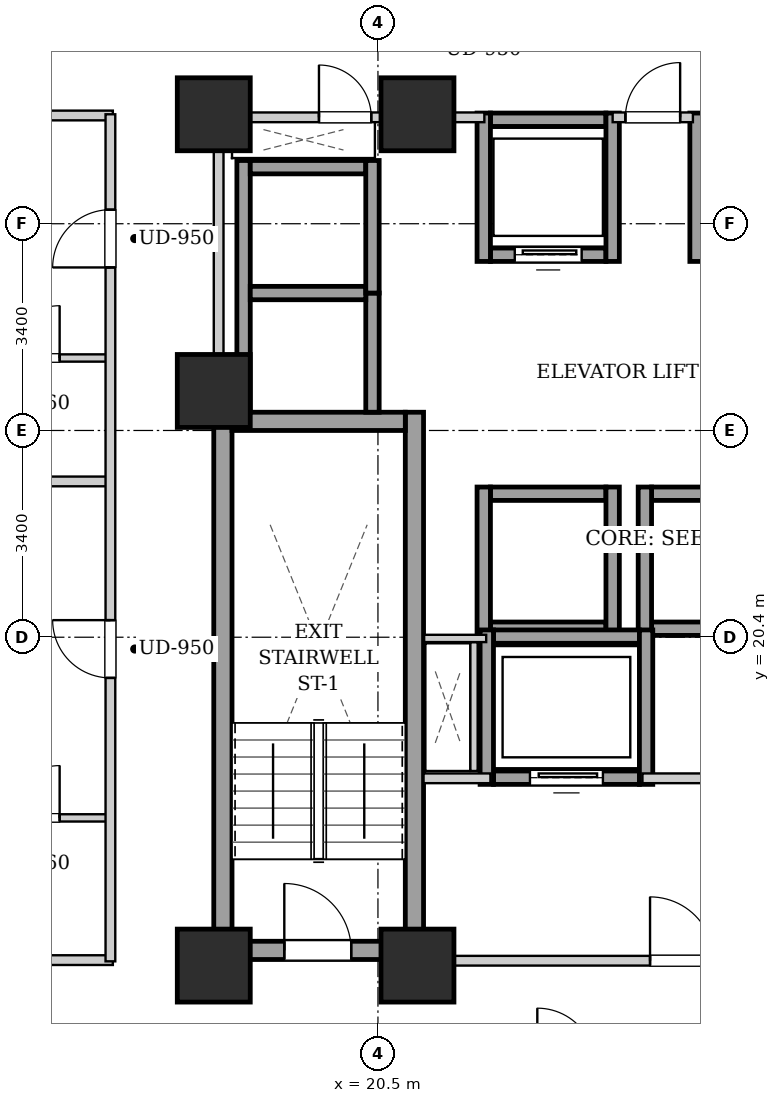
"""IFC4 building model, lengths in metres.
Left out: names, types, materials, properties, quantities, classifications, styles, units other than length and angle.
Written with IfcOpenShell. Run it as: python <this file> out.ifc"""

import sys

from ifc_helpers import new_model, si_unit, direction, frame, frame_2d, origin, origin_2d, place, context, subcontext, project, spatial, rectangle, extrude, element, fill, save


model = new_model("IFC4")
c1 = context("Model", 3, precision=1e-05, world=origin(), true_north=direction((0.0, 1.0)))
c2 = subcontext(c1, "Body", "Model", "MODEL_VIEW")
j1 = project(units=[si_unit("LENGTHUNIT", "METRE"), si_unit("PLANEANGLEUNIT", "RADIAN")], contexts=[c1])
p1 = place(None, origin())
s1 = spatial("IfcSite", under=j1, at=p1, CompositionType="ELEMENT")
p2 = place(p1, origin())
s2 = spatial("IfcBuilding", under=s1, at=p2, CompositionType="ELEMENT")
p3 = place(p2, frame((0.0, 0.0, 67.4)))
s3 = spatial("IfcBuildingStorey", under=s2, at=p3, CompositionType="ELEMENT", Elevation=67.4)
for number, where, z_axis, x_axis in (
    (1, (17.8, 15.0, 0.0), (0.0, 0.0, 1.0), (1.0, 0.0, 0.0)),
    (2, (21.15, 15.0, 0.0), (0.0, 0.0, 1.0), (1.0, 0.0, 0.0)),
    (3, (17.8, 29.0, 0.0), (0.0, 0.0, 1.0), (1.0, 0.0, 0.0)),
    (4, (21.15, 29.0, 0.0), (0.0, 0.0, 1.0), (1.0, 0.0, 0.0)),
    (5, (17.8, 24.45, 0.0), (0.0, 0.0, 1.0), (1.0, 0.0, 0.0)),
):
    element("IfcColumn", number, at=place(p3, frame(where, z_axis=z_axis, x_axis=x_axis)), inside=s3, PredefinedType="COLUMN", context=c2, shape_type="SweptSolid", body=[
        extrude(rectangle(XDim=1.2, YDim=1.2, at=origin_2d()), origin(), (0.0, 0.0, 1.0), 3.2),
    ])
for number, where, z_axis, x_axis in (
    (6, (17.95, 15.1, 0.0), (0.0, 0.0, 1.0), (0.0, 1.0, 0.0)),
    (7, (21.1, 15.1, 0.0), (0.0, 0.0, 1.0), (0.0, 1.0, 0.0)),
):
    element("IfcWall", number, at=place(p3, frame(where, z_axis=z_axis, x_axis=x_axis)), inside=s3, PredefinedType="SHEAR", context=c2, shape_type="SweptSolid", body=[
        extrude(rectangle(XDim=9.0, YDim=0.3, at=frame_2d((4.5, 0.0))), origin(), (0.0, 0.0, 1.0), 2.88),
    ])
p4 = place(p3, frame((18.1, 23.95, 0.0), z_axis=(0.0, 0.0, 1.0), x_axis=(1.0, 0.0, 0.0)))
e8 = element("IfcWall", 8, at=p4, inside=s3, PredefinedType="SHEAR", context=c2, shape_type="SweptSolid", body=[
    extrude(rectangle(XDim=2.85, YDim=0.3, at=frame_2d((1.425, 0.0))), origin(), (0.0, 0.0, 1.0), 2.88),
])
p5 = place(p3, frame((18.1, 15.25, 0.0), z_axis=(0.0, 0.0, 1.0), x_axis=(1.0, 0.0, 0.0)))
e9 = element("IfcWall", 9, at=p5, inside=s3, PredefinedType="SHEAR", context=c2, shape_type="SweptSolid", body=[
    extrude(rectangle(XDim=2.85, YDim=0.3, at=frame_2d((1.425, 0.0))), origin(), (0.0, 0.0, 1.0), 2.88),
])
p6 = place(p5, frame((0.86, 0.0, 0.0)))
e10 = element("IfcOpeningElement", 10, at=p6, cuts=e9, PredefinedType="OPENING", context=c2, shape_type="SweptSolid", body=[
    extrude(rectangle(XDim=1.1, YDim=2.05, at=frame_2d((0.55, 1.025))), frame((0.0, 0.16, 0.0), z_axis=(0.0, -1.0, 0.0), x_axis=(1.0, 0.0, 0.0)), (0.0, 0.0, 1.0), 0.32),
])
p7 = place(p3, frame((22.35, 26.69, 0.0), z_axis=(0.0, 0.0, 1.0), x_axis=(1.0, 0.0, 0.0)))
e11 = element("IfcWall", 11, at=p7, inside=s3, PredefinedType="SHEAR", context=c2, shape_type="SweptSolid", body=[
    extrude(rectangle(XDim=1.9, YDim=0.22, at=frame_2d((0.95, 0.0))), origin(), (0.0, 0.0, 1.0), 2.88),
])
p8 = place(p7, frame((0.4, 0.0, 0.0)))
e12 = element("IfcOpeningElement", 12, at=p8, cuts=e11, PredefinedType="OPENING", context=c2, shape_type="SweptSolid", body=[
    extrude(rectangle(XDim=1.1, YDim=2.15, at=frame_2d((0.55, 1.075))), frame((0.0, 0.12, 0.0), z_axis=(0.0, -1.0, 0.0), x_axis=(1.0, 0.0, 0.0)), (0.0, 0.0, 1.0), 0.24),
])
p9 = place(p3, frame((22.35, 28.91, 0.0), z_axis=(0.0, 0.0, 1.0), x_axis=(1.0, 0.0, 0.0)))
e13 = element("IfcWall", 13, at=p9, inside=s3, PredefinedType="SHEAR", context=c2, shape_type="SweptSolid", body=[
    extrude(rectangle(XDim=1.9, YDim=0.22, at=frame_2d((0.95, 0.0))), origin(), (0.0, 0.0, 1.0), 2.88),
])
for number, where, z_axis, x_axis in (
    (14, (22.24, 26.58, 0.0), (0.0, 0.0, 1.0), (0.0, 1.0, 0.0)),
    (15, (24.36, 26.58, 0.0), (0.0, 0.0, 1.0), (0.0, 1.0, 0.0)),
    (16, (25.74, 26.58, 0.0), (0.0, 0.0, 1.0), (0.0, 1.0, 0.0)),
):
    element("IfcWall", number, at=place(p3, frame(where, z_axis=z_axis, x_axis=x_axis)), inside=s3, PredefinedType="SHEAR", context=c2, shape_type="SweptSolid", body=[
        extrude(rectangle(XDim=2.44, YDim=0.22, at=frame_2d((1.22, 0.0))), origin(), (0.0, 0.0, 1.0), 2.88),
    ])
for number, where, z_axis, x_axis in (
    (17, (22.35, 20.54, 0.0), (0.0, 0.0, 1.0), (1.0, 0.0, 0.0)),
    (18, (22.35, 22.76, 0.0), (0.0, 0.0, 1.0), (1.0, 0.0, 0.0)),
):
    element("IfcWall", number, at=place(p3, frame(where, z_axis=z_axis, x_axis=x_axis)), inside=s3, PredefinedType="SHEAR", context=c2, shape_type="SweptSolid", body=[
        extrude(rectangle(XDim=1.9, YDim=0.22, at=frame_2d((0.95, 0.0))), origin(), (0.0, 0.0, 1.0), 2.88),
    ])
for number, where, z_axis, x_axis in (
    (19, (22.24, 20.43, 0.0), (0.0, 0.0, 1.0), (0.0, 1.0, 0.0)),
    (20, (24.36, 20.43, 0.0), (0.0, 0.0, 1.0), (0.0, 1.0, 0.0)),
):
    element("IfcWall", number, at=place(p3, frame(where, z_axis=z_axis, x_axis=x_axis)), inside=s3, PredefinedType="SHEAR", context=c2, shape_type="SweptSolid", body=[
        extrude(rectangle(XDim=2.44, YDim=0.22, at=frame_2d((1.22, 0.0))), origin(), (0.0, 0.0, 1.0), 2.88),
    ])
for number, where, z_axis, x_axis in (
    (21, (25.0, 20.54, 0.0), (0.0, 0.0, 1.0), (1.0, 0.0, 0.0)),
    (22, (25.0, 22.76, 0.0), (0.0, 0.0, 1.0), (1.0, 0.0, 0.0)),
):
    element("IfcWall", number, at=place(p3, frame(where, z_axis=z_axis, x_axis=x_axis)), inside=s3, PredefinedType="SHEAR", context=c2, shape_type="SweptSolid", body=[
        extrude(rectangle(XDim=1.9, YDim=0.22, at=frame_2d((0.95, 0.0))), origin(), (0.0, 0.0, 1.0), 2.88),
    ])
p10 = place(p3, frame((24.89, 20.43, 0.0), z_axis=(0.0, 0.0, 1.0), x_axis=(0.0, 1.0, 0.0)))
e23 = element("IfcWall", 23, at=p10, inside=s3, PredefinedType="SHEAR", context=c2, shape_type="SweptSolid", body=[
    extrude(rectangle(XDim=2.44, YDim=0.22, at=frame_2d((1.22, 0.0))), origin(), (0.0, 0.0, 1.0), 2.88),
])
p11 = place(p3, frame((18.29, 24.1, 0.0), z_axis=(0.0, 0.0, 1.0), x_axis=(0.0, 1.0, 0.0)))
e24 = element("IfcWall", 24, at=p11, inside=s3, PredefinedType="SHEAR", context=c2, shape_type="SweptSolid", body=[
    extrude(rectangle(XDim=4.14, YDim=0.22, at=frame_2d((2.07, 0.0))), origin(), (0.0, 0.0, 1.0), 2.88),
])
p12 = place(p3, frame((20.41, 24.1, 0.0), z_axis=(0.0, 0.0, 1.0), x_axis=(0.0, 1.0, 0.0)))
e25 = element("IfcWall", 25, at=p12, inside=s3, PredefinedType="SHEAR", context=c2, shape_type="SweptSolid", body=[
    extrude(rectangle(XDim=1.96, YDim=0.22, at=frame_2d((0.98, 0.0))), origin(), (0.0, 0.0, 1.0), 2.88),
])
for number, where, z_axis, x_axis in (
    (26, (18.4, 26.06, 0.0), (0.0, 0.0, 1.0), (1.0, 0.0, 0.0)),
    (27, (18.4, 28.13, 0.0), (0.0, 0.0, 1.0), (1.0, 0.0, 0.0)),
):
    element("IfcWall", number, at=place(p3, frame(where, z_axis=z_axis, x_axis=x_axis)), inside=s3, PredefinedType="SHEAR", context=c2, shape_type="SweptSolid", body=[
        extrude(rectangle(XDim=1.9, YDim=0.22, at=frame_2d((0.95, 0.0))), origin(), (0.0, 0.0, 1.0), 2.88),
    ])
p13 = place(p3, frame((20.41, 26.06, 0.0), z_axis=(0.0, 0.0, 1.0), x_axis=(0.0, 1.0, 0.0)))
e28 = element("IfcWall", 28, at=p13, inside=s3, PredefinedType="SHEAR", context=c2, shape_type="SweptSolid", body=[
    extrude(rectangle(XDim=2.18, YDim=0.22, at=frame_2d((1.09, 0.0))), origin(), (0.0, 0.0, 1.0), 2.88),
])
p14 = place(p3, frame((22.4, 18.09, 0.0), z_axis=(0.0, 0.0, 1.0), x_axis=(1.0, 0.0, 0.0)))
e29 = element("IfcWall", 29, at=p14, inside=s3, PredefinedType="SHEAR", context=c2, shape_type="SweptSolid", body=[
    extrude(rectangle(XDim=2.4, YDim=0.22, at=frame_2d((1.2, 0.0))), origin(), (0.0, 0.0, 1.0), 2.88),
])
p15 = place(p14, frame((0.6, 0.0, 0.0)))
e30 = element("IfcOpeningElement", 30, at=p15, cuts=e29, PredefinedType="OPENING", context=c2, shape_type="SweptSolid", body=[
    extrude(rectangle(XDim=1.2, YDim=2.15, at=frame_2d((0.6, 1.075))), frame((0.0, 0.12, 0.0), z_axis=(0.0, -1.0, 0.0), x_axis=(1.0, 0.0, 0.0)), (0.0, 0.0, 1.0), 0.24),
])
p16 = place(p3, frame((22.4, 20.41, 0.0), z_axis=(0.0, 0.0, 1.0), x_axis=(1.0, 0.0, 0.0)))
e31 = element("IfcWall", 31, at=p16, inside=s3, PredefinedType="SHEAR", context=c2, shape_type="SweptSolid", body=[
    extrude(rectangle(XDim=2.4, YDim=0.22, at=frame_2d((1.2, 0.0))), origin(), (0.0, 0.0, 1.0), 2.88),
])
for number, where, z_axis, x_axis in (
    (32, (22.29, 17.98, 0.0), (0.0, 0.0, 1.0), (0.0, 1.0, 0.0)),
    (33, (24.91, 17.98, 0.0), (0.0, 0.0, 1.0), (0.0, 1.0, 0.0)),
):
    element("IfcWall", number, at=place(p3, frame(where, z_axis=z_axis, x_axis=x_axis)), inside=s3, PredefinedType="SHEAR", context=c2, shape_type="SweptSolid", body=[
        extrude(rectangle(XDim=2.54, YDim=0.22, at=frame_2d((1.27, 0.0))), origin(), (0.0, 0.0, 1.0), 2.88),
    ])
p17 = place(p3, frame((21.25, 15.08, 0.0), z_axis=(0.0, 0.0, 1.0), x_axis=(1.0, 0.0, 0.0)))
e34 = element("IfcWall", 34, at=p17, inside=s3, PredefinedType="PARTITIONING", context=c2, shape_type="SweptSolid", body=[
    extrude(rectangle(XDim=8.5, YDim=0.16, at=frame_2d((4.25, 0.0))), origin(), (0.0, 0.0, 1.0), 2.172),
])
p18 = place(p17, frame((3.725, 0.0, 0.0)))
e35 = element("IfcOpeningElement", 35, at=p18, cuts=e34, PredefinedType="OPENING", context=c2, shape_type="SweptSolid", body=[
    extrude(rectangle(XDim=1.05, YDim=2.05, at=frame_2d((0.525, 1.025))), frame((0.0, 0.09, 0.0), z_axis=(0.0, -1.0, 0.0), x_axis=(1.0, 0.0, 0.0)), (0.0, 0.0, 1.0), 0.18),
])
p19 = place(p3, frame((21.25, 18.08, 0.0), z_axis=(0.0, 0.0, 1.0), x_axis=(1.0, 0.0, 0.0)))
e36 = element("IfcWall", 36, at=p19, inside=s3, PredefinedType="PARTITIONING", context=c2, shape_type="SweptSolid", body=[
    extrude(rectangle(XDim=1.1, YDim=0.16, at=frame_2d((0.55, 0.0))), origin(), (0.0, 0.0, 1.0), 2.88),
])
p20 = place(p3, frame((24.85, 18.08, 0.0), z_axis=(0.0, 0.0, 1.0), x_axis=(1.0, 0.0, 0.0)))
e37 = element("IfcWall", 37, at=p20, inside=s3, PredefinedType="PARTITIONING", context=c2, shape_type="SweptSolid", body=[
    extrude(rectangle(XDim=1.3, YDim=0.16, at=frame_2d((0.65, 0.0))), origin(), (0.0, 0.0, 1.0), 2.88),
])
p21 = place(p3, frame((17.88, 24.12, 0.0), z_axis=(0.0, 0.0, 1.0), x_axis=(0.0, 1.0, 0.0)))
e38 = element("IfcWall", 38, at=p21, inside=s3, PredefinedType="PARTITIONING", context=c2, shape_type="SweptSolid", body=[
    extrude(rectangle(XDim=4.76, YDim=0.16, at=frame_2d((2.38, 0.0))), origin(), (0.0, 0.0, 1.0), 2.215),
])
p22 = place(p3, frame((24.36, 28.95, 0.0), z_axis=(0.0, 0.0, 1.0), x_axis=(1.0, 0.0, 0.0)))
e39 = element("IfcWall", 39, at=p22, inside=s3, PredefinedType="PARTITIONING", context=c2, shape_type="SweptSolid", body=[
    extrude(rectangle(XDim=1.32, YDim=0.16, at=frame_2d((0.66, 0.0))), origin(), (0.0, 0.0, 1.0), 2.172),
])
p23 = place(p22, frame((0.21, 0.0, 0.0)))
e40 = element("IfcOpeningElement", 40, at=p23, cuts=e39, PredefinedType="OPENING", context=c2, shape_type="SweptSolid", body=[
    extrude(rectangle(XDim=0.9, YDim=2.05, at=frame_2d((0.45, 1.025))), frame((0.0, 0.09, 0.0), z_axis=(0.0, -1.0, 0.0), x_axis=(1.0, 0.0, 0.0)), (0.0, 0.0, 1.0), 0.18),
])
p24 = place(p3, frame((17.96, 28.95, 0.0), z_axis=(0.0, 0.0, 1.0), x_axis=(1.0, 0.0, 0.0)))
e41 = element("IfcWall", 41, at=p24, inside=s3, PredefinedType="PARTITIONING", context=c2, shape_type="SweptSolid", body=[
    extrude(rectangle(XDim=4.29, YDim=0.16, at=frame_2d((2.145, 0.0))), origin(), (0.0, 0.0, 1.0), 2.172),
])
p25 = place(p24, frame((1.57, 0.0, 0.0)))
e42 = element("IfcOpeningElement", 42, at=p25, cuts=e41, PredefinedType="OPENING", context=c2, shape_type="SweptSolid", body=[
    extrude(rectangle(XDim=0.86, YDim=2.05, at=frame_2d((0.43, 1.025))), frame((0.0, 0.09, 0.0), z_axis=(0.0, -1.0, 0.0), x_axis=(1.0, 0.0, 0.0)), (0.0, 0.0, 1.0), 0.18),
])
p26 = place(p3, frame((22.08, 18.2, 0.0), z_axis=(0.0, 0.0, 1.0), x_axis=(0.0, 1.0, 0.0)))
e43 = element("IfcWall", 43, at=p26, inside=s3, PredefinedType="PARTITIONING", context=c2, shape_type="SweptSolid", body=[
    extrude(rectangle(XDim=2.12, YDim=0.12, at=frame_2d((1.06, 0.0))), origin(), (0.0, 0.0, 1.0), 2.88),
])
p27 = place(p3, frame((22.28, 20.38, 0.0), z_axis=(0.0, 0.0, 1.0), x_axis=(-1.0, 0.0, 0.0)))
e44 = element("IfcWall", 44, at=p27, inside=s3, PredefinedType="PARTITIONING", context=c2, shape_type="SweptSolid", body=[
    extrude(rectangle(XDim=1.02, YDim=0.12, at=frame_2d((0.51, 0.0))), origin(), (0.0, 0.0, 1.0), 2.88),
])
for number, where, z_axis, x_axis in (
    (45, (7.78, 15.09, 0.0), (0.0, 0.0, 1.0), (1.0, 0.0, 0.0)),
    (46, (7.78, 28.98, 0.0), (0.0, 0.0, 1.0), (1.0, 0.0, 0.0)),
):
    element("IfcWall", number, at=place(p3, frame(where, z_axis=z_axis, x_axis=x_axis)), inside=s3, PredefinedType="PARTITIONING", context=c2, shape_type="SweptSolid", body=[
        extrude(rectangle(XDim=8.36, YDim=0.16, at=frame_2d((4.18, 0.0))), origin(), (0.0, 0.0, 1.0), 2.172),
    ])
p28 = place(p3, frame((7.78, 22.962, 0.0), z_axis=(0.0, 0.0, 1.0), x_axis=(1.0, 0.0, 0.0)))
e47 = element("IfcWall", 47, at=p28, inside=s3, PredefinedType="PARTITIONING", context=c2, shape_type="SweptSolid", body=[
    extrude(rectangle(XDim=8.28, YDim=0.16, at=frame_2d((4.14, 0.0))), origin(), (0.0, 0.0, 1.0), 2.88),
])
p29 = place(p3, frame((13.61, 17.429, 0.0), z_axis=(0.0, 0.0, 1.0), x_axis=(1.0, 0.0, 0.0)))
e48 = element("IfcWall", 48, at=p29, inside=s3, PredefinedType="PARTITIONING", context=c2, shape_type="SweptSolid", body=[
    extrude(rectangle(XDim=2.45, YDim=0.12, at=frame_2d((1.225, 0.0))), origin(), (0.0, 0.0, 1.0), 2.88),
])
p30 = place(p29, frame((0.795, 0.0, 0.0)))
e49 = element("IfcOpeningElement", 49, at=p30, cuts=e48, PredefinedType="OPENING", context=c2, shape_type="SweptSolid", body=[
    extrude(rectangle(XDim=0.86, YDim=2.05, at=frame_2d((0.43, 1.025))), frame((0.0, 0.07, 0.0), z_axis=(0.0, -1.0, 0.0), x_axis=(1.0, 0.0, 0.0)), (0.0, 0.0, 1.0), 0.14),
])
p31 = place(p3, frame((13.61, 24.992, 0.0), z_axis=(0.0, 0.0, 1.0), x_axis=(1.0, 0.0, 0.0)))
e50 = element("IfcWall", 50, at=p31, inside=s3, PredefinedType="PARTITIONING", context=c2, shape_type="SweptSolid", body=[
    extrude(rectangle(XDim=2.45, YDim=0.12, at=frame_2d((1.225, 0.0))), origin(), (0.0, 0.0, 1.0), 2.88),
])
p32 = place(p31, frame((0.795, 0.0, 0.0)))
e51 = element("IfcOpeningElement", 51, at=p32, cuts=e50, PredefinedType="OPENING", context=c2, shape_type="SweptSolid", body=[
    extrude(rectangle(XDim=0.86, YDim=2.05, at=frame_2d((0.43, 1.025))), frame((0.0, 0.07, 0.0), z_axis=(0.0, -1.0, 0.0), x_axis=(1.0, 0.0, 0.0)), (0.0, 0.0, 1.0), 0.14),
])
p33 = place(p3, frame((16.1, 15.07, 0.0), z_axis=(0.0, 0.0, 1.0), x_axis=(0.0, 1.0, 0.0)))
e52 = element("IfcWall", 52, at=p33, inside=s3, PredefinedType="PARTITIONING", context=c2, shape_type="SweptSolid", body=[
    extrude(rectangle(XDim=13.93, YDim=0.16, at=frame_2d((6.965, 0.0))), origin(), (0.0, 0.0, 1.0), 2.88),
])
p34 = place(p33, frame((4.661, 0.0, 0.0)))
e53 = element("IfcOpeningElement", 53, at=p34, cuts=e52, PredefinedType="OPENING", context=c2, shape_type="SweptSolid", body=[
    extrude(rectangle(XDim=0.95, YDim=2.1, at=frame_2d((0.475, 1.05))), frame((0.0, 0.09, 0.0), z_axis=(0.0, -1.0, 0.0), x_axis=(1.0, 0.0, 0.0)), (0.0, 0.0, 1.0), 0.18),
])
p35 = place(p33, frame((11.411, 0.0, 0.0)))
e54 = element("IfcOpeningElement", 54, at=p35, cuts=e52, PredefinedType="OPENING", context=c2, shape_type="SweptSolid", body=[
    extrude(rectangle(XDim=0.95, YDim=2.1, at=frame_2d((0.475, 1.05))), frame((0.0, 0.09, 0.0), z_axis=(0.0, -1.0, 0.0), x_axis=(1.0, 0.0, 0.0)), (0.0, 0.0, 1.0), 0.18),
])
p36 = place(p6, origin())
e55 = element("IfcDoor", 55, at=p36, inside=s3, OperationType="SINGLE_SWING_LEFT", PredefinedType="DOOR", context=c2, shape_type="SweptSolid", body=[
    extrude(rectangle(XDim=1.1, YDim=2.05, at=frame_2d((0.55, 1.025))), frame((0.0, 0.025, 0.0), z_axis=(0.0, -1.0, 0.0), x_axis=(1.0, 0.0, 0.0)), (0.0, 0.0, 1.0), 0.05),
])
fill(e10, e55)
p37 = place(p8, origin())
e56 = element("IfcDoor", 56, at=p37, inside=s3, OperationType="SLIDING_TO_LEFT", PredefinedType="DOOR", context=c2, shape_type="SweptSolid", body=[
    extrude(rectangle(XDim=1.1, YDim=2.15, at=frame_2d((0.55, 1.075))), frame((0.0, 0.025, 0.0), z_axis=(0.0, -1.0, 0.0), x_axis=(1.0, 0.0, 0.0)), (0.0, 0.0, 1.0), 0.05),
])
fill(e12, e56)
p38 = place(p15, origin())
e57 = element("IfcDoor", 57, at=p38, inside=s3, OperationType="SLIDING_TO_LEFT", PredefinedType="DOOR", context=c2, shape_type="SweptSolid", body=[
    extrude(rectangle(XDim=1.2, YDim=2.15, at=frame_2d((0.6, 1.075))), frame((0.0, 0.025, 0.0), z_axis=(0.0, -1.0, 0.0), x_axis=(1.0, 0.0, 0.0)), (0.0, 0.0, 1.0), 0.05),
])
fill(e30, e57)
p39 = place(p18, origin())
e58 = element("IfcDoor", 58, at=p39, inside=s3, OperationType="SINGLE_SWING_LEFT", PredefinedType="DOOR", context=c2, shape_type="SweptSolid", body=[
    extrude(rectangle(XDim=1.05, YDim=2.05, at=frame_2d((0.525, 1.025))), frame((0.0, 0.025, 0.0), z_axis=(0.0, -1.0, 0.0), x_axis=(1.0, 0.0, 0.0)), (0.0, 0.0, 1.0), 0.05),
])
fill(e35, e58)
p40 = place(p23, origin())
e59 = element("IfcDoor", 59, at=p40, inside=s3, OperationType="SINGLE_SWING_RIGHT", PredefinedType="DOOR", context=c2, shape_type="SweptSolid", body=[
    extrude(rectangle(XDim=0.9, YDim=2.05, at=frame_2d((0.45, 1.025))), frame((0.0, 0.025, 0.0), z_axis=(0.0, -1.0, 0.0), x_axis=(1.0, 0.0, 0.0)), (0.0, 0.0, 1.0), 0.05),
])
fill(e40, e59)
p41 = place(p25, origin())
e60 = element("IfcDoor", 60, at=p41, inside=s3, OperationType="SINGLE_SWING_LEFT", PredefinedType="DOOR", context=c2, shape_type="SweptSolid", body=[
    extrude(rectangle(XDim=0.86, YDim=2.05, at=frame_2d((0.43, 1.025))), frame((0.0, 0.025, 0.0), z_axis=(0.0, -1.0, 0.0), x_axis=(1.0, 0.0, 0.0)), (0.0, 0.0, 1.0), 0.05),
])
fill(e42, e60)
p42 = place(p30, origin())
e61 = element("IfcDoor", 61, at=p42, inside=s3, OperationType="SINGLE_SWING_RIGHT", PredefinedType="DOOR", context=c2, shape_type="SweptSolid", body=[
    extrude(rectangle(XDim=0.86, YDim=2.05, at=frame_2d((0.43, 1.025))), frame((0.0, 0.025, 0.0), z_axis=(0.0, -1.0, 0.0), x_axis=(1.0, 0.0, 0.0)), (0.0, 0.0, 1.0), 0.05),
])
fill(e49, e61)
p43 = place(p32, origin())
e62 = element("IfcDoor", 62, at=p43, inside=s3, OperationType="SINGLE_SWING_RIGHT", PredefinedType="DOOR", context=c2, shape_type="SweptSolid", body=[
    extrude(rectangle(XDim=0.86, YDim=2.05, at=frame_2d((0.43, 1.025))), frame((0.0, 0.025, 0.0), z_axis=(0.0, -1.0, 0.0), x_axis=(1.0, 0.0, 0.0)), (0.0, 0.0, 1.0), 0.05),
])
fill(e51, e62)
p44 = place(p34, origin())
e63 = element("IfcDoor", 63, at=p44, inside=s3, OperationType="SINGLE_SWING_RIGHT", PredefinedType="DOOR", context=c2, shape_type="SweptSolid", body=[
    extrude(rectangle(XDim=0.95, YDim=2.1, at=frame_2d((0.475, 1.05))), frame((0.0, 0.025, 0.0), z_axis=(0.0, -1.0, 0.0), x_axis=(1.0, 0.0, 0.0)), (0.0, 0.0, 1.0), 0.05),
])
fill(e53, e63)
p45 = place(p35, origin())
e64 = element("IfcDoor", 64, at=p45, inside=s3, OperationType="SINGLE_SWING_LEFT", PredefinedType="DOOR", context=c2, shape_type="SweptSolid", body=[
    extrude(rectangle(XDim=0.95, YDim=2.1, at=frame_2d((0.475, 1.05))), frame((0.0, 0.025, 0.0), z_axis=(0.0, -1.0, 0.0), x_axis=(1.0, 0.0, 0.0)), (0.0, 0.0, 1.0), 0.05),
])
fill(e54, e64)
save(model, sys.argv[1])
